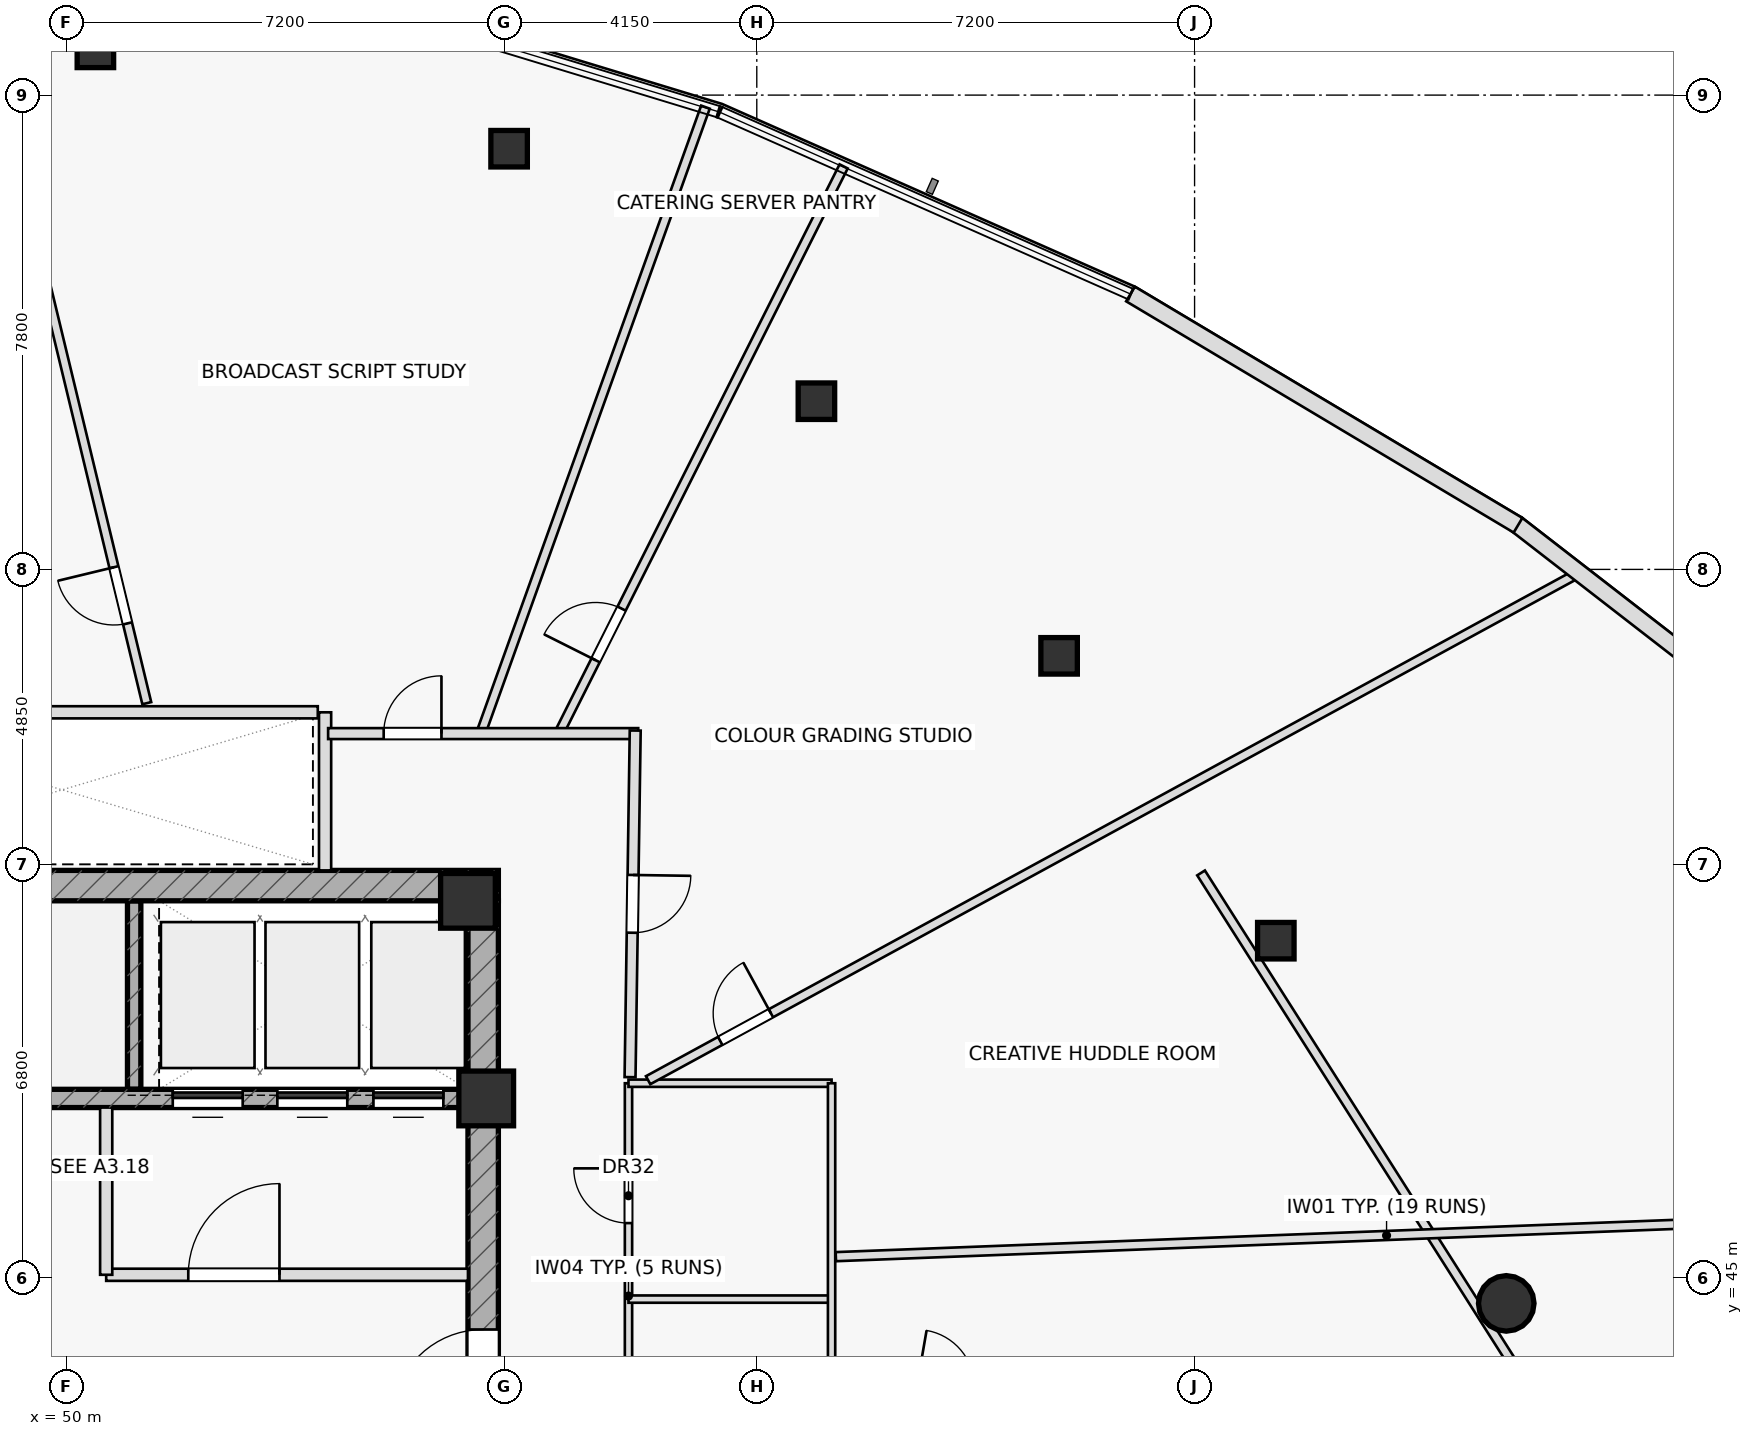
"""IFC4 building model, lengths in metres.
Left out: names, types, materials, properties, quantities, classifications, styles, units other than length and angle.
Written with IfcOpenShell. Run it as: python <this file> out.ifc"""

import sys

from ifc_helpers import new_model, si_unit, direction, frame, frame_2d, origin, origin_2d, place, context, subcontext, project, spatial, rectangle, hollow_rectangle, hollow_circle, extrude, element, fill, save


model = new_model("IFC4")
c1 = context("Model", 3, precision=1e-05, world=origin(), true_north=direction((0.0, 1.0)))
c2 = subcontext(c1, "Body", "Model", "MODEL_VIEW")
j1 = project(units=[si_unit("LENGTHUNIT", "METRE"), si_unit("PLANEANGLEUNIT", "RADIAN")], contexts=[c1])
p1 = place(None, origin())
s1 = spatial("IfcSite", under=j1, at=p1, CompositionType="ELEMENT")
p2 = place(p1, origin())
s2 = spatial("IfcBuilding", under=s1, at=p2, CompositionType="ELEMENT")
p3 = place(p2, frame((0.0, 0.0, 200.3)))
s3 = spatial("IfcBuildingStorey", under=s2, at=p3, CompositionType="ELEMENT", Elevation=200.3)
p4 = place(p3, frame((51.11, 48.1, 0.0), z_axis=(0.0, 0.0, 1.0), x_axis=(0.0, 1.0, 0.0)))
e1 = element("IfcWall", 1, at=p4, inside=s3, PredefinedType="SHEAR", context=c2, shape_type="SweptSolid", body=[
    extrude(rectangle(XDim=3.1, YDim=0.22, at=frame_2d((1.55, 0.0))), origin(), (0.0, 0.0, 1.0), 3.55),
])
p5 = place(p3, frame((42.9, 51.45, 0.0), z_axis=(0.0, 0.0, 1.0), x_axis=(1.0, 0.0, 0.0)))
e2 = element("IfcWall", 2, at=p5, inside=s3, PredefinedType="SHEAR", context=c2, shape_type="SweptSolid", body=[
    extrude(rectangle(XDim=14.2, YDim=0.5, at=frame_2d((7.1, 0.0))), origin(), (0.0, 0.0, 1.0), 3.55),
])
p6 = place(p5, frame((0.78, 0.0, 0.0)))
e3 = element("IfcOpeningElement", 3, at=p6, cuts=e2, PredefinedType="OPENING", context=c2, shape_type="SweptSolid", body=[
    extrude(rectangle(XDim=1.05, YDim=2.2, at=frame_2d((0.525, 1.1))), frame((0.0, 0.26, 0.0), z_axis=(0.0, -1.0, 0.0), x_axis=(1.0, 0.0, 0.0)), (0.0, 0.0, 1.0), 0.52),
])
p7 = place(p3, frame((56.85, 38.8, 0.0), z_axis=(0.0, 0.0, 1.0), x_axis=(0.0, 1.0, 0.0)))
e4 = element("IfcWall", 4, at=p7, inside=s3, PredefinedType="SHEAR", context=c2, shape_type="SweptSolid", body=[
    extrude(rectangle(XDim=12.4, YDim=0.5, at=frame_2d((6.2, 0.0))), origin(), (0.0, 0.0, 1.0), 3.55),
])
p8 = place(p7, frame((3.85, 0.0, 0.0)))
e5 = element("IfcOpeningElement", 5, at=p8, cuts=e4, PredefinedType="OPENING", context=c2, shape_type="SweptSolid", body=[
    extrude(rectangle(XDim=1.5, YDim=2.2, at=frame_2d((0.75, 1.1))), frame((0.0, 0.26, 0.0), z_axis=(0.0, -1.0, 0.0), x_axis=(1.0, 0.0, 0.0)), (0.0, 0.0, 1.0), 0.52),
])
p9 = place(p3, frame((43.4, 47.95, 0.0), z_axis=(0.0, 0.0, 1.0), x_axis=(1.0, 0.0, 0.0)))
e6 = element("IfcWall", 6, at=p9, inside=s3, PredefinedType="SHEAR", context=c2, shape_type="SweptSolid", body=[
    extrude(rectangle(XDim=13.2, YDim=0.3, at=frame_2d((6.6, 0.0))), origin(), (0.0, 0.0, 1.0), 3.55),
])
p10 = place(p9, frame((8.345, 0.0, 0.0)))
e7 = element("IfcOpeningElement", 7, at=p10, cuts=e6, PredefinedType="OPENING", context=c2, shape_type="SweptSolid", body=[
    extrude(rectangle(XDim=1.15, YDim=2.2, at=frame_2d((0.575, 1.1))), frame((0.0, 0.16, 0.0), z_axis=(0.0, -1.0, 0.0), x_axis=(1.0, 0.0, 0.0)), (0.0, 0.0, 1.0), 0.32),
])
p11 = place(p9, frame((10.065, 0.0, 0.0)))
e8 = element("IfcOpeningElement", 8, at=p11, cuts=e6, PredefinedType="OPENING", context=c2, shape_type="SweptSolid", body=[
    extrude(rectangle(XDim=1.15, YDim=2.2, at=frame_2d((0.575, 1.1))), frame((0.0, 0.16, 0.0), z_axis=(0.0, -1.0, 0.0), x_axis=(1.0, 0.0, 0.0)), (0.0, 0.0, 1.0), 0.32),
])
p12 = place(p9, frame((11.645, 0.0, 0.0)))
e9 = element("IfcOpeningElement", 9, at=p12, cuts=e6, PredefinedType="OPENING", context=c2, shape_type="SweptSolid", body=[
    extrude(rectangle(XDim=1.15, YDim=2.2, at=frame_2d((0.575, 1.1))), frame((0.0, 0.16, 0.0), z_axis=(0.0, -1.0, 0.0), x_axis=(1.0, 0.0, 0.0)), (0.0, 0.0, 1.0), 0.32),
])
for number, where, z_axis, x_axis in (
    (10, (56.9, 47.95, 0.0), (0.0, 0.0, 1.0), (1.0, 0.0, 0.0)),
    (11, (56.6, 51.2, 0.0), (0.0, 0.0, 1.0), (1.0, 0.0, 0.0)),
):
    element("IfcColumn", number, at=place(p3, frame(where, z_axis=z_axis, x_axis=x_axis)), inside=s3, PredefinedType="COLUMN", context=c2, shape_type="SweptSolid", body=[
        extrude(rectangle(XDim=0.9, YDim=0.9, at=origin_2d()), origin(), (0.0, 0.0, 1.0), 3.55),
    ])
p13 = place(p3, frame((73.676, 44.58, 0.0), z_axis=(0.0, 0.0, 1.0), x_axis=(1.0, 0.0, 0.0)))
e12 = element("IfcColumn", 12, at=p13, inside=s3, PredefinedType="COLUMN", context=c2, shape_type="SweptSolid", body=[
    extrude(hollow_circle(Radius=0.457, WallThickness=0.04, at=origin_2d()), origin(), (0.0, 0.0, 1.0), 3.55),
])
for number, where, z_axis, x_axis in (
    (13, (69.886, 50.544, 0.0), (0.0, 0.0, 1.0), (1.0, 0.0, 0.0)),
    (14, (66.322, 55.229, 0.0), (0.0, 0.0, 1.0), (1.0, 0.0, 0.0)),
    (15, (62.331, 59.416, 0.0), (0.0, 0.0, 1.0), (1.0, 0.0, 0.0)),
    (16, (57.277, 63.568, 0.0), (0.0, 0.0, 1.0), (1.0, 0.0, 0.0)),
    (17, (50.472, 65.202, 0.0), (0.0, 0.0, 1.0), (1.0, 0.0, 0.0)),
):
    element("IfcColumn", number, at=place(p3, frame(where, z_axis=z_axis, x_axis=x_axis)), inside=s3, PredefinedType="COLUMN", context=c2, shape_type="SweptSolid", body=[
        extrude(hollow_rectangle(XDim=0.6, YDim=0.6, WallThickness=0.036, at=origin_2d()), origin(), (0.0, 0.0, 1.0), 3.55),
    ])
p14 = place(p3, frame((54.25, 51.7, 0.0), z_axis=(0.0, 0.0, 1.0), x_axis=(0.0, 1.0, 0.0)))
e18 = element("IfcWall", 18, at=p14, inside=s3, PredefinedType="PARTITIONING", context=c2, shape_type="SweptSolid", body=[
    extrude(rectangle(XDim=2.6, YDim=0.2, at=frame_2d((1.3, 0.0))), origin(), (0.0, 0.0, 1.0), 3.55),
])
p15 = place(p3, frame((50.65, 45.05, 0.0), z_axis=(0.0, 0.0, 1.0), x_axis=(1.0, 0.0, 0.0)))
e19 = element("IfcWall", 19, at=p15, inside=s3, PredefinedType="PARTITIONING", context=c2, shape_type="SweptSolid", body=[
    extrude(rectangle(XDim=5.95, YDim=0.2, at=frame_2d((2.975, 0.0))), origin(), (0.0, 0.0, 1.0), 3.55),
])
p16 = place(p15, frame((1.35, 0.0, 0.0)))
e20 = element("IfcOpeningElement", 20, at=p16, cuts=e19, PredefinedType="OPENING", context=c2, shape_type="SweptSolid", body=[
    extrude(rectangle(XDim=1.5, YDim=2.2, at=frame_2d((0.75, 1.1))), frame((0.0, 0.11, 0.0), z_axis=(0.0, -1.0, 0.0), x_axis=(1.0, 0.0, 0.0)), (0.0, 0.0, 1.0), 0.22),
])
p17 = place(p3, frame((50.65, 45.05, 0.0), z_axis=(0.0, 0.0, 1.0), x_axis=(0.0, 1.0, 0.0)))
e21 = element("IfcWall", 21, at=p17, inside=s3, PredefinedType="PARTITIONING", context=c2, shape_type="SweptSolid", body=[
    extrude(rectangle(XDim=2.75, YDim=0.2, at=frame_2d((1.375, 0.0))), origin(), (0.0, 0.0, 1.0), 3.55),
])
p18 = place(p3, frame((74.163, 42.993, 0.0), z_axis=(0.0, 0.0, 1.0), x_axis=(-0.53628142437, 0.844039237166, 0.0)))
e22 = element("IfcWall", 22, at=p18, inside=s3, PredefinedType="PARTITIONING", context=c2, shape_type="SweptSolid", body=[
    extrude(rectangle(XDim=10.267, YDim=0.15, at=frame_2d((5.133, 0.0))), origin(), (0.0, 0.0, 1.0), 2.935),
])
p19 = place(p3, frame((59.24, 41.2, 0.0), z_axis=(0.0, 0.0, 1.0), x_axis=(0.0, 1.0, 0.0)))
e23 = element("IfcWall", 23, at=p19, inside=s3, PredefinedType="PARTITIONING", context=c2, shape_type="SweptSolid", body=[
    extrude(rectangle(XDim=7.0, YDim=0.12, at=frame_2d((3.5, 0.0))), origin(), (0.0, 0.0, 1.0), 3.55),
])
p20 = place(p19, frame((1.15, 0.0, 0.0)))
e24 = element("IfcOpeningElement", 24, at=p20, cuts=e23, PredefinedType="OPENING", context=c2, shape_type="SweptSolid", body=[
    extrude(rectangle(XDim=0.9, YDim=2.05, at=frame_2d((0.45, 1.025))), frame((0.0, 0.07, 0.0), z_axis=(0.0, -1.0, 0.0), x_axis=(1.0, 0.0, 0.0)), (0.0, 0.0, 1.0), 0.14),
])
p21 = place(p19, frame((4.7, 0.0, 0.0)))
e25 = element("IfcOpeningElement", 25, at=p21, cuts=e23, PredefinedType="OPENING", context=c2, shape_type="SweptSolid", body=[
    extrude(rectangle(XDim=0.9, YDim=2.05, at=frame_2d((0.45, 1.025))), frame((0.0, 0.07, 0.0), z_axis=(0.0, -1.0, 0.0), x_axis=(1.0, 0.0, 0.0)), (0.0, 0.0, 1.0), 0.14),
])
for number, where, z_axis, x_axis in (
    (26, (59.24, 44.65, 0.0), (0.0, 0.0, 1.0), (1.0, 0.0, 0.0)),
    (27, (59.24, 48.2, 0.0), (0.0, 0.0, 1.0), (1.0, 0.0, 0.0)),
):
    element("IfcWall", number, at=place(p3, frame(where, z_axis=z_axis, x_axis=x_axis)), inside=s3, PredefinedType="PARTITIONING", context=c2, shape_type="SweptSolid", body=[
        extrude(rectangle(XDim=3.34, YDim=0.12, at=frame_2d((1.67, 0.0))), origin(), (0.0, 0.0, 1.0), 3.55),
    ])
p22 = place(p3, frame((62.58, 41.2, 0.0), z_axis=(0.0, 0.0, 1.0), x_axis=(0.0, 1.0, 0.0)))
e28 = element("IfcWall", 28, at=p22, inside=s3, PredefinedType="PARTITIONING", context=c2, shape_type="SweptSolid", body=[
    extrude(rectangle(XDim=7.0, YDim=0.12, at=frame_2d((3.5, 0.0))), origin(), (0.0, 0.0, 1.0), 3.55),
])
p23 = place(p3, frame((62.65, 45.348, 0.0), z_axis=(0.0, 0.0, 1.0), x_axis=(0.99926109506, 0.038435190907, 0.0)))
e29 = element("IfcWall", 29, at=p23, inside=s3, PredefinedType="PARTITIONING", context=c2, shape_type="SweptSolid", body=[
    extrude(rectangle(XDim=18.129, YDim=0.15, at=frame_2d((9.064, 0.0))), origin(), (0.0, 0.0, 1.0), 3.025),
])
p24 = place(p3, frame((59.563, 48.25, 0.0), z_axis=(0.0, 0.0, 1.0), x_axis=(0.87805113136, 0.478566829938, 0.0)))
e30 = element("IfcWall", 30, at=p24, inside=s3, PredefinedType="PARTITIONING", context=c2, shape_type="SweptSolid", body=[
    extrude(rectangle(XDim=17.449, YDim=0.15, at=frame_2d((8.724, 0.0))), origin(), (0.0, 0.0, 1.0), 2.935),
])
p25 = place(p24, frame((1.35, 0.0, 0.0)))
e31 = element("IfcOpeningElement", 31, at=p25, cuts=e30, PredefinedType="OPENING", context=c2, shape_type="SweptSolid", body=[
    extrude(rectangle(XDim=0.95, YDim=2.05, at=frame_2d((0.475, 1.025))), frame((0.0, 0.085, 0.0), z_axis=(0.0, -1.0, 0.0), x_axis=(1.0, 0.0, 0.0)), (0.0, 0.0, 1.0), 0.17),
])
p26 = place(p3, frame((58.094, 53.95, 0.0), z_axis=(0.0, 0.0, 1.0), x_axis=(0.448756656044, 0.89365399549, 0.0)))
e32 = element("IfcWall", 32, at=p26, inside=s3, PredefinedType="PARTITIONING", context=c2, shape_type="SweptSolid", body=[
    extrude(rectangle(XDim=10.438, YDim=0.15, at=frame_2d((5.219, 0.0))), origin(), (0.0, 0.0, 1.0), 3.025),
])
p27 = place(p26, frame((1.35, 0.0, 0.0)))
e33 = element("IfcOpeningElement", 33, at=p27, cuts=e32, PredefinedType="OPENING", context=c2, shape_type="SweptSolid", body=[
    extrude(rectangle(XDim=0.95, YDim=2.05, at=frame_2d((0.475, 1.025))), frame((0.0, 0.085, 0.0), z_axis=(0.0, -1.0, 0.0), x_axis=(1.0, 0.0, 0.0)), (0.0, 0.0, 1.0), 0.17),
])
p28 = place(p3, frame((56.81, 53.95, 0.0), z_axis=(0.0, 0.0, 1.0), x_axis=(0.337627623522, 0.941279760663, 0.0)))
e34 = element("IfcWall", 34, at=p28, inside=s3, PredefinedType="PARTITIONING", context=c2, shape_type="SweptSolid", body=[
    extrude(rectangle(XDim=10.945, YDim=0.15, at=frame_2d((5.472, 0.0))), origin(), (0.0, 0.0, 1.0), 2.935),
])
p29 = place(p3, frame((51.318, 54.45, 0.0), z_axis=(0.0, 0.0, 1.0), x_axis=(-0.234780806693, 0.97204833872, 0.0)))
e35 = element("IfcWall", 35, at=p29, inside=s3, PredefinedType="PARTITIONING", context=c2, shape_type="SweptSolid", body=[
    extrude(rectangle(XDim=13.214, YDim=0.15, at=frame_2d((6.607, 0.0))), origin(), (0.0, 0.0, 1.0), 3.025),
])
p30 = place(p29, frame((1.35, 0.0, 0.0)))
e36 = element("IfcOpeningElement", 36, at=p30, cuts=e35, PredefinedType="OPENING", context=c2, shape_type="SweptSolid", body=[
    extrude(rectangle(XDim=0.95, YDim=2.05, at=frame_2d((0.475, 1.025))), frame((0.0, 0.085, 0.0), z_axis=(0.0, -1.0, 0.0), x_axis=(1.0, 0.0, 0.0)), (0.0, 0.0, 1.0), 0.17),
])
p31 = place(p3, frame((54.3, 53.95, 0.0), z_axis=(0.0, 0.0, 1.0), x_axis=(1.0, 0.0, 0.0)))
e37 = element("IfcWall", 37, at=p31, inside=s3, PredefinedType="PARTITIONING", context=c2, shape_type="SweptSolid", body=[
    extrude(rectangle(XDim=5.1, YDim=0.18, at=frame_2d((2.55, 0.0))), origin(), (0.0, 0.0, 1.0), 2.935),
])
p32 = place(p31, frame((0.914, 0.0, 0.0)))
e38 = element("IfcOpeningElement", 38, at=p32, cuts=e37, PredefinedType="OPENING", context=c2, shape_type="SweptSolid", body=[
    extrude(rectangle(XDim=0.95, YDim=2.05, at=frame_2d((0.475, 1.025))), frame((0.0, 0.1, 0.0), z_axis=(0.0, -1.0, 0.0), x_axis=(1.0, 0.0, 0.0)), (0.0, 0.0, 1.0), 0.2),
])
p33 = place(p3, frame((59.351, 54.0, 0.0), z_axis=(0.0, 0.0, 1.0), x_axis=(-0.014903899768, -0.999888930718, 0.0)))
e39 = element("IfcWall", 39, at=p33, inside=s3, PredefinedType="PARTITIONING", context=c2, shape_type="SweptSolid", body=[
    extrude(rectangle(XDim=5.701, YDim=0.18, at=frame_2d((2.85, 0.0))), origin(), (0.0, 0.0, 1.0), 2.935),
])
p34 = place(p33, frame((2.375, 0.0, 0.0)))
e40 = element("IfcOpeningElement", 40, at=p34, cuts=e39, PredefinedType="OPENING", context=c2, shape_type="SweptSolid", body=[
    extrude(rectangle(XDim=0.95, YDim=2.05, at=frame_2d((0.475, 1.025))), frame((0.0, 0.1, 0.0), z_axis=(0.0, -1.0, 0.0), x_axis=(1.0, 0.0, 0.0)), (0.0, 0.0, 1.0), 0.2),
])
p35 = place(p3, frame((79.72, 52.839, 0.0), z_axis=(0.0, 0.0, 1.0), x_axis=(-0.790429761354, 0.612552685379, 0.0)))
e41 = element("IfcWall", 41, at=p35, inside=s3, PredefinedType="STANDARD", context=c2, shape_type="SweptSolid", body=[
    extrude(rectangle(XDim=7.434, YDim=0.28, at=frame_2d((3.717, 0.0))), origin(), (0.0, 0.0, 1.0), 3.55),
])
p36 = place(p3, frame((73.869, 57.376, 0.0), z_axis=(0.0, 0.0, 1.0), x_axis=(-0.858715385241, 0.51245281456, 0.0)))
e42 = element("IfcWall", 42, at=p36, inside=s3, PredefinedType="STANDARD", context=c2, shape_type="SweptSolid", body=[
    extrude(rectangle(XDim=7.422, YDim=0.28, at=frame_2d((3.711, 0.0))), origin(), (0.0, 0.0, 1.0), 3.55),
])
p37 = place(p3, frame((45.82, 54.3, 0.0), z_axis=(0.0, 0.0, 1.0), x_axis=(1.0, 0.0, 0.0)))
e43 = element("IfcWall", 43, at=p37, inside=s3, PredefinedType="PARTITIONING", context=c2, shape_type="SweptSolid", body=[
    extrude(rectangle(XDim=8.31, YDim=0.2, at=frame_2d((4.155, 0.0))), origin(), (0.0, 0.0, 1.0), 3.55),
])
p38 = place(p8, origin())
e44 = element("IfcDoor", 44, at=p38, inside=s3, OperationType="SINGLE_SWING_LEFT", PredefinedType="DOOR", context=c2, shape_type="SweptSolid", body=[
    extrude(rectangle(XDim=1.5, YDim=2.2, at=frame_2d((0.75, 1.1))), frame((0.0, 0.025, 0.0), z_axis=(0.0, -1.0, 0.0), x_axis=(1.0, 0.0, 0.0)), (0.0, 0.0, 1.0), 0.05),
])
fill(e5, e44)
p39 = place(p16, origin())
e45 = element("IfcDoor", 45, at=p39, inside=s3, OperationType="SINGLE_SWING_RIGHT", PredefinedType="DOOR", context=c2, shape_type="SweptSolid", body=[
    extrude(rectangle(XDim=1.5, YDim=2.2, at=frame_2d((0.75, 1.1))), frame((0.0, 0.025, 0.0), z_axis=(0.0, -1.0, 0.0), x_axis=(1.0, 0.0, 0.0)), (0.0, 0.0, 1.0), 0.05),
])
fill(e20, e45)
p40 = place(p21, origin())
e46 = element("IfcDoor", 46, at=p40, inside=s3, OperationType="SINGLE_SWING_RIGHT", PredefinedType="DOOR", context=c2, shape_type="SweptSolid", body=[
    extrude(rectangle(XDim=0.9, YDim=2.05, at=frame_2d((0.45, 1.025))), frame((0.0, 0.025, 0.0), z_axis=(0.0, -1.0, 0.0), x_axis=(1.0, 0.0, 0.0)), (0.0, 0.0, 1.0), 0.05),
])
fill(e25, e46)
p41 = place(p25, origin())
e47 = element("IfcDoor", 47, at=p41, inside=s3, OperationType="SINGLE_SWING_RIGHT", PredefinedType="DOOR", context=c2, shape_type="SweptSolid", body=[
    extrude(rectangle(XDim=0.95, YDim=2.05, at=frame_2d((0.475, 1.025))), frame((0.0, 0.025, 0.0), z_axis=(0.0, -1.0, 0.0), x_axis=(1.0, 0.0, 0.0)), (0.0, 0.0, 1.0), 0.05),
])
fill(e31, e47)
p42 = place(p27, origin())
e48 = element("IfcDoor", 48, at=p42, inside=s3, OperationType="SINGLE_SWING_LEFT", PredefinedType="DOOR", context=c2, shape_type="SweptSolid", body=[
    extrude(rectangle(XDim=0.95, YDim=2.05, at=frame_2d((0.475, 1.025))), frame((0.0, 0.025, 0.0), z_axis=(0.0, -1.0, 0.0), x_axis=(1.0, 0.0, 0.0)), (0.0, 0.0, 1.0), 0.05),
])
fill(e33, e48)
p43 = place(p30, origin())
e49 = element("IfcDoor", 49, at=p43, inside=s3, OperationType="SINGLE_SWING_RIGHT", PredefinedType="DOOR", context=c2, shape_type="SweptSolid", body=[
    extrude(rectangle(XDim=0.95, YDim=2.05, at=frame_2d((0.475, 1.025))), frame((0.0, 0.025, 0.0), z_axis=(0.0, -1.0, 0.0), x_axis=(1.0, 0.0, 0.0)), (0.0, 0.0, 1.0), 0.05),
])
fill(e36, e49)
p44 = place(p32, origin())
e50 = element("IfcDoor", 50, at=p44, inside=s3, OperationType="SINGLE_SWING_RIGHT", PredefinedType="DOOR", context=c2, shape_type="SweptSolid", body=[
    extrude(rectangle(XDim=0.95, YDim=2.05, at=frame_2d((0.475, 1.025))), frame((0.0, 0.025, 0.0), z_axis=(0.0, -1.0, 0.0), x_axis=(1.0, 0.0, 0.0)), (0.0, 0.0, 1.0), 0.05),
])
fill(e38, e50)
p45 = place(p34, origin())
e51 = element("IfcDoor", 51, at=p45, inside=s3, OperationType="SINGLE_SWING_LEFT", PredefinedType="DOOR", context=c2, shape_type="SweptSolid", body=[
    extrude(rectangle(XDim=0.95, YDim=2.05, at=frame_2d((0.475, 1.025))), frame((0.0, 0.025, 0.0), z_axis=(0.0, -1.0, 0.0), x_axis=(1.0, 0.0, 0.0)), (0.0, 0.0, 1.0), 0.05),
])
fill(e40, e51)
p46 = place(p10, origin())
e52 = element("IfcDoor", 52, at=p46, inside=s3, OperationType="SLIDING_TO_LEFT", PredefinedType="DOOR", context=c2, shape_type="SweptSolid", body=[
    extrude(rectangle(XDim=1.15, YDim=2.2, at=frame_2d((0.575, 1.1))), frame((0.0, 0.025, 0.0), z_axis=(0.0, -1.0, 0.0), x_axis=(1.0, 0.0, 0.0)), (0.0, 0.0, 1.0), 0.05),
])
fill(e7, e52)
p47 = place(p11, origin())
e53 = element("IfcDoor", 53, at=p47, inside=s3, OperationType="SLIDING_TO_LEFT", PredefinedType="DOOR", context=c2, shape_type="SweptSolid", body=[
    extrude(rectangle(XDim=1.15, YDim=2.2, at=frame_2d((0.575, 1.1))), frame((0.0, 0.025, 0.0), z_axis=(0.0, -1.0, 0.0), x_axis=(1.0, 0.0, 0.0)), (0.0, 0.0, 1.0), 0.05),
])
fill(e8, e53)
p48 = place(p12, origin())
e54 = element("IfcDoor", 54, at=p48, inside=s3, OperationType="SLIDING_TO_LEFT", PredefinedType="DOOR", context=c2, shape_type="SweptSolid", body=[
    extrude(rectangle(XDim=1.15, YDim=2.2, at=frame_2d((0.575, 1.1))), frame((0.0, 0.025, 0.0), z_axis=(0.0, -1.0, 0.0), x_axis=(1.0, 0.0, 0.0)), (0.0, 0.0, 1.0), 0.05),
])
fill(e9, e54)
save(model, sys.argv[1])
